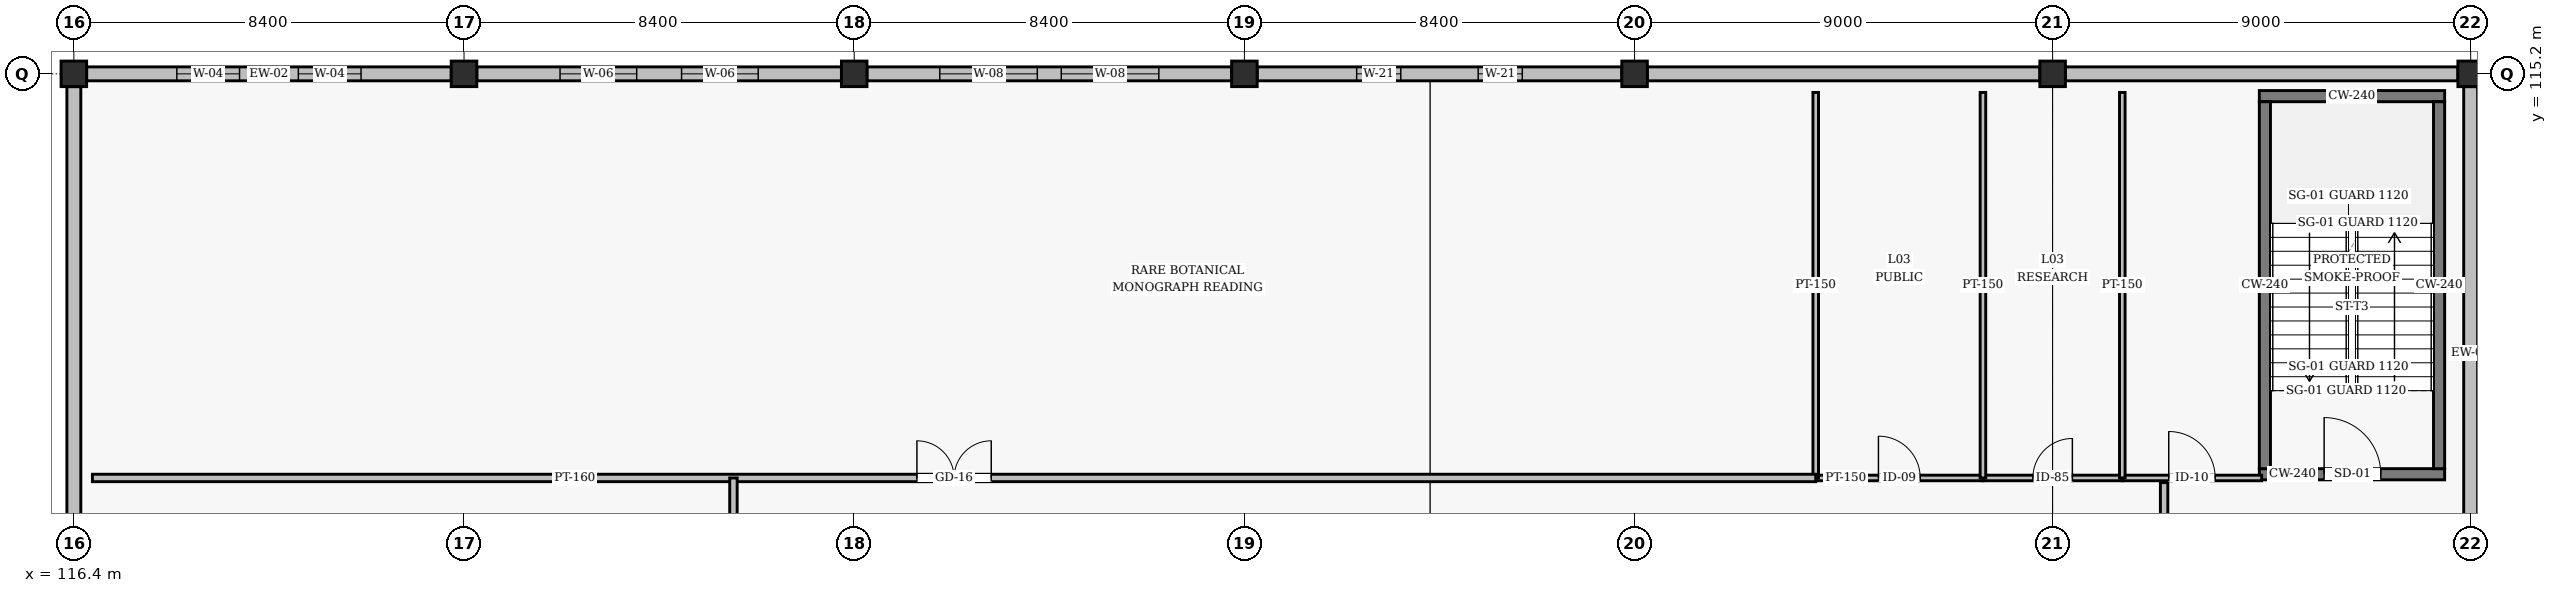
"""IFC4 building model, lengths in metres.
Left out: names, types, materials, properties, quantities, classifications, styles, units other than length and angle.
Written with IfcOpenShell. Run it as: python <this file> out.ifc"""

import sys

from ifc_helpers import new_model, si_unit, direction, frame, frame_2d, origin, origin_2d, place, context, subcontext, project, spatial, rectangle, hollow_rectangle, extrude, element, fill, save


model = new_model("IFC4")
c1 = context("Model", 3, precision=1e-05, world=origin(), true_north=direction((0.0, 1.0)))
c2 = subcontext(c1, "Body", "Model", "MODEL_VIEW")
j1 = project(units=[si_unit("LENGTHUNIT", "METRE"), si_unit("PLANEANGLEUNIT", "RADIAN")], contexts=[c1])
p1 = place(None, origin())
s1 = spatial("IfcSite", under=j1, at=p1, CompositionType="ELEMENT")
p2 = place(p1, origin())
s2 = spatial("IfcBuilding", under=s1, at=p2, CompositionType="ELEMENT")
p3 = place(p2, frame((0.0, 0.0, 13.2)))
s3 = spatial("IfcBuildingStorey", under=s2, at=p3, CompositionType="ELEMENT", Elevation=13.2)
for number, where, z_axis, x_axis in (
    (1, (116.4, 115.2, 0.0), (0.0, 0.0, 1.0), (1.0, 0.0, 0.0)),
    (2, (124.8, 115.2, 0.0), (0.0, 0.0, 1.0), (1.0, 0.0, 0.0)),
    (3, (133.2, 115.2, 0.0), (0.0, 0.0, 1.0), (1.0, 0.0, 0.0)),
    (4, (141.6, 115.2, 0.0), (0.0, 0.0, 1.0), (1.0, 0.0, 0.0)),
    (5, (150.0, 115.2, 0.0), (0.0, 0.0, 1.0), (1.0, 0.0, 0.0)),
    (6, (159.0, 115.2, 0.0), (0.0, 0.0, 1.0), (1.0, 0.0, 0.0)),
    (7, (168.0, 115.2, 0.0), (0.0, 0.0, 1.0), (1.0, 0.0, 0.0)),
):
    element("IfcColumn", number, at=place(p3, frame(where, z_axis=z_axis, x_axis=x_axis)), inside=s3, PredefinedType="COLUMN", context=c2, shape_type="SweptSolid", body=[
        extrude(hollow_rectangle(XDim=0.55, YDim=0.55, WallThickness=0.022, InnerFilletRadius=0.022, OuterFilletRadius=0.044, at=origin_2d()), origin(), (0.0, 0.0, 1.0), 3.9),
    ])
p4 = place(p3, frame((168.0, 103.475, 0.0), z_axis=(0.0, 0.0, 1.0), x_axis=(0.0, 1.0, 0.0)))
e8 = element("IfcWall", 8, at=p4, inside=s3, PredefinedType="SOLIDWALL", context=c2, shape_type="SweptSolid", body=[
    extrude(rectangle(XDim=11.45, YDim=0.3, at=frame_2d((5.725, 0.0))), origin(), (0.0, 0.0, 1.0), 2.828),
])
for number, where, z_axis, x_axis in (
    (9, (167.725, 115.2, 0.0), (0.0, 0.0, 1.0), (-1.0, 0.0, 0.0)),
    (10, (158.725, 115.2, 0.0), (0.0, 0.0, 1.0), (-1.0, 0.0, 0.0)),
):
    element("IfcWall", number, at=place(p3, frame(where, z_axis=z_axis, x_axis=x_axis)), inside=s3, PredefinedType="SOLIDWALL", context=c2, shape_type="SweptSolid", body=[
        extrude(rectangle(XDim=8.45, YDim=0.3, at=frame_2d((4.225, 0.0))), origin(), (0.0, 0.0, 1.0), 2.828),
    ])
p5 = place(p3, frame((149.725, 115.2, 0.0), z_axis=(0.0, 0.0, 1.0), x_axis=(-1.0, 0.0, 0.0)))
e11 = element("IfcWall", 11, at=p5, inside=s3, PredefinedType="SOLIDWALL", context=c2, shape_type="SweptSolid", body=[
    extrude(rectangle(XDim=7.85, YDim=0.3, at=frame_2d((3.925, 0.0))), origin(), (0.0, 0.0, 1.0), 2.928),
])
p6 = place(p5, frame((2.142, 0.0, 0.95)))
e12 = element("IfcOpeningElement", 12, at=p6, cuts=e11, PredefinedType="OPENING", context=c2, shape_type="SweptSolid", body=[
    extrude(rectangle(XDim=0.95, YDim=1.68, at=frame_2d((0.475, 0.84))), frame((0.0, 0.16, 0.0), z_axis=(0.0, -1.0, 0.0), x_axis=(1.0, 0.0, 0.0)), (0.0, 0.0, 1.0), 0.32),
])
p7 = place(p5, frame((4.758, 0.0, 0.95)))
e13 = element("IfcOpeningElement", 13, at=p7, cuts=e11, PredefinedType="OPENING", context=c2, shape_type="SweptSolid", body=[
    extrude(rectangle(XDim=0.95, YDim=1.68, at=frame_2d((0.475, 0.84))), frame((0.0, 0.16, 0.0), z_axis=(0.0, -1.0, 0.0), x_axis=(1.0, 0.0, 0.0)), (0.0, 0.0, 1.0), 0.32),
])
p8 = place(p3, frame((141.325, 115.2, 0.0), z_axis=(0.0, 0.0, 1.0), x_axis=(-1.0, 0.0, 0.0)))
e14 = element("IfcWall", 14, at=p8, inside=s3, PredefinedType="SOLIDWALL", context=c2, shape_type="SweptSolid", body=[
    extrude(rectangle(XDim=7.85, YDim=0.3, at=frame_2d((3.925, 0.0))), origin(), (0.0, 0.0, 1.0), 2.928),
])
p9 = place(p8, frame((1.567, 0.0, 0.85)))
e15 = element("IfcOpeningElement", 15, at=p9, cuts=e14, PredefinedType="OPENING", context=c2, shape_type="SweptSolid", body=[
    extrude(rectangle(XDim=2.1, YDim=1.78, at=frame_2d((1.05, 0.89))), frame((0.0, 0.16, 0.0), z_axis=(0.0, -1.0, 0.0), x_axis=(1.0, 0.0, 0.0)), (0.0, 0.0, 1.0), 0.32),
])
p10 = place(p8, frame((4.183, 0.0, 0.85)))
e16 = element("IfcOpeningElement", 16, at=p10, cuts=e14, PredefinedType="OPENING", context=c2, shape_type="SweptSolid", body=[
    extrude(rectangle(XDim=2.1, YDim=1.78, at=frame_2d((1.05, 0.89))), frame((0.0, 0.16, 0.0), z_axis=(0.0, -1.0, 0.0), x_axis=(1.0, 0.0, 0.0)), (0.0, 0.0, 1.0), 0.32),
])
p11 = place(p3, frame((132.925, 115.2, 0.0), z_axis=(0.0, 0.0, 1.0), x_axis=(-1.0, 0.0, 0.0)))
e17 = element("IfcWall", 17, at=p11, inside=s3, PredefinedType="SOLIDWALL", context=c2, shape_type="SweptSolid", body=[
    extrude(rectangle(XDim=7.85, YDim=0.3, at=frame_2d((3.925, 0.0))), origin(), (0.0, 0.0, 1.0), 2.928),
])
p12 = place(p11, frame((1.792, 0.0, 0.85)))
e18 = element("IfcOpeningElement", 18, at=p12, cuts=e17, PredefinedType="OPENING", context=c2, shape_type="SweptSolid", body=[
    extrude(rectangle(XDim=1.65, YDim=1.78, at=frame_2d((0.825, 0.89))), frame((0.0, 0.16, 0.0), z_axis=(0.0, -1.0, 0.0), x_axis=(1.0, 0.0, 0.0)), (0.0, 0.0, 1.0), 0.32),
])
p13 = place(p11, frame((4.408, 0.0, 0.85)))
e19 = element("IfcOpeningElement", 19, at=p13, cuts=e17, PredefinedType="OPENING", context=c2, shape_type="SweptSolid", body=[
    extrude(rectangle(XDim=1.65, YDim=1.78, at=frame_2d((0.825, 0.89))), frame((0.0, 0.16, 0.0), z_axis=(0.0, -1.0, 0.0), x_axis=(1.0, 0.0, 0.0)), (0.0, 0.0, 1.0), 0.32),
])
p14 = place(p3, frame((124.525, 115.2, 0.0), z_axis=(0.0, 0.0, 1.0), x_axis=(-1.0, 0.0, 0.0)))
e20 = element("IfcWall", 20, at=p14, inside=s3, PredefinedType="SOLIDWALL", context=c2, shape_type="SweptSolid", body=[
    extrude(rectangle(XDim=7.85, YDim=0.3, at=frame_2d((3.925, 0.0))), origin(), (0.0, 0.0, 1.0), 2.928),
])
p15 = place(p14, frame((1.942, 0.0, 0.85)))
e21 = element("IfcOpeningElement", 21, at=p15, cuts=e20, PredefinedType="OPENING", context=c2, shape_type="SweptSolid", body=[
    extrude(rectangle(XDim=1.35, YDim=1.78, at=frame_2d((0.675, 0.89))), frame((0.0, 0.16, 0.0), z_axis=(0.0, -1.0, 0.0), x_axis=(1.0, 0.0, 0.0)), (0.0, 0.0, 1.0), 0.32),
])
p16 = place(p14, frame((4.558, 0.0, 0.85)))
e22 = element("IfcOpeningElement", 22, at=p16, cuts=e20, PredefinedType="OPENING", context=c2, shape_type="SweptSolid", body=[
    extrude(rectangle(XDim=1.35, YDim=1.78, at=frame_2d((0.675, 0.89))), frame((0.0, 0.16, 0.0), z_axis=(0.0, -1.0, 0.0), x_axis=(1.0, 0.0, 0.0)), (0.0, 0.0, 1.0), 0.32),
])
p17 = place(p3, frame((116.4, 114.925, 0.0), z_axis=(0.0, 0.0, 1.0), x_axis=(0.0, -1.0, 0.0)))
e23 = element("IfcWall", 23, at=p17, inside=s3, PredefinedType="SOLIDWALL", context=c2, shape_type="SweptSolid", body=[
    extrude(rectangle(XDim=11.45, YDim=0.3, at=frame_2d((5.725, 0.0))), origin(), (0.0, 0.0, 1.0), 2.828),
])
p18 = place(p3, frame((163.45, 106.58, 0.0), z_axis=(0.0, 0.0, 1.0), x_axis=(1.0, 0.0, 0.0)))
e24 = element("IfcWall", 24, at=p18, inside=s3, PredefinedType="SHEAR", context=c2, shape_type="SweptSolid", body=[
    extrude(rectangle(XDim=3.99, YDim=0.24, at=frame_2d((1.995, 0.0))), origin(), (0.0, 0.0, 1.0), 3.62),
])
p19 = place(p18, frame((1.395, 0.0, 0.0)))
e25 = element("IfcOpeningElement", 25, at=p19, cuts=e24, PredefinedType="OPENING", context=c2, shape_type="SweptSolid", body=[
    extrude(rectangle(XDim=1.22, YDim=2.18, at=frame_2d((0.61, 1.09))), frame((0.0, 0.13, 0.0), z_axis=(0.0, -1.0, 0.0), x_axis=(1.0, 0.0, 0.0)), (0.0, 0.0, 1.0), 0.26),
])
p20 = place(p3, frame((163.45, 114.72, 0.0), z_axis=(0.0, 0.0, 1.0), x_axis=(1.0, 0.0, 0.0)))
e26 = element("IfcWall", 26, at=p20, inside=s3, PredefinedType="SHEAR", context=c2, shape_type="SweptSolid", body=[
    extrude(rectangle(XDim=3.99, YDim=0.24, at=frame_2d((1.995, 0.0))), origin(), (0.0, 0.0, 1.0), 3.62),
])
for number, where, z_axis, x_axis in (
    (27, (163.57, 106.7, 0.0), (0.0, 0.0, 1.0), (0.0, 1.0, 0.0)),
    (28, (167.32, 106.7, 0.0), (0.0, 0.0, 1.0), (0.0, 1.0, 0.0)),
):
    element("IfcWall", number, at=place(p3, frame(where, z_axis=z_axis, x_axis=x_axis)), inside=s3, PredefinedType="SHEAR", context=c2, shape_type="SweptSolid", body=[
        extrude(rectangle(XDim=7.9, YDim=0.24, at=frame_2d((3.95, 0.0))), origin(), (0.0, 0.0, 1.0), 3.62),
    ])
p21 = place(p3, frame((153.9, 106.5, 0.0), z_axis=(0.0, 0.0, 1.0), x_axis=(1.0, 0.0, 0.0)))
e29 = element("IfcWall", 29, at=p21, inside=s3, PredefinedType="PARTITIONING", context=c2, shape_type="SweptSolid", body=[
    extrude(rectangle(XDim=3.6, YDim=0.12, at=frame_2d((1.8, 0.0))), origin(), (0.0, 0.0, 1.0), 3.62),
])
p22 = place(p21, frame((1.35, 0.0, 0.0)))
e30 = element("IfcOpeningElement", 30, at=p22, cuts=e29, PredefinedType="OPENING", context=c2, shape_type="SweptSolid", body=[
    extrude(rectangle(XDim=0.9, YDim=2.1, at=frame_2d((0.45, 1.05))), frame((0.0, 0.07, 0.0), z_axis=(0.0, -1.0, 0.0), x_axis=(1.0, 0.0, 0.0)), (0.0, 0.0, 1.0), 0.14),
])
p23 = place(p3, frame((157.5, 106.5, 0.0), z_axis=(0.0, 0.0, 1.0), x_axis=(1.0, 0.0, 0.0)))
e31 = element("IfcWall", 31, at=p23, inside=s3, PredefinedType="PARTITIONING", context=c2, shape_type="SweptSolid", body=[
    extrude(rectangle(XDim=3.0, YDim=0.12, at=frame_2d((1.5, 0.0))), origin(), (0.0, 0.0, 1.0), 2.92),
])
p24 = place(p23, frame((1.075, 0.0, 0.0)))
e32 = element("IfcOpeningElement", 32, at=p24, cuts=e31, PredefinedType="OPENING", context=c2, shape_type="SweptSolid", body=[
    extrude(rectangle(XDim=0.85, YDim=2.1, at=frame_2d((0.425, 1.05))), frame((0.0, 0.07, 0.0), z_axis=(0.0, -1.0, 0.0), x_axis=(1.0, 0.0, 0.0)), (0.0, 0.0, 1.0), 0.14),
])
p25 = place(p3, frame((160.5, 106.5, 0.0), z_axis=(0.0, 0.0, 1.0), x_axis=(1.0, 0.0, 0.0)))
e33 = element("IfcWall", 33, at=p25, inside=s3, PredefinedType="PARTITIONING", context=c2, shape_type="SweptSolid", body=[
    extrude(rectangle(XDim=3.0, YDim=0.12, at=frame_2d((1.5, 0.0))), origin(), (0.0, 0.0, 1.0), 3.62),
])
p26 = place(p25, frame((1.0, 0.0, 0.0)))
e34 = element("IfcOpeningElement", 34, at=p26, cuts=e33, PredefinedType="OPENING", context=c2, shape_type="SweptSolid", body=[
    extrude(rectangle(XDim=1.0, YDim=2.1, at=frame_2d((0.5, 1.05))), frame((0.0, 0.07, 0.0), z_axis=(0.0, -1.0, 0.0), x_axis=(1.0, 0.0, 0.0)), (0.0, 0.0, 1.0), 0.14),
])
for number, where, z_axis, x_axis in (
    (35, (153.9, 106.5, 0.0), (0.0, 0.0, 1.0), (0.0, 1.0, 0.0)),
    (36, (157.5, 106.5, 0.0), (0.0, 0.0, 1.0), (0.0, 1.0, 0.0)),
):
    element("IfcWall", number, at=place(p3, frame(where, z_axis=z_axis, x_axis=x_axis)), inside=s3, PredefinedType="PARTITIONING", context=c2, shape_type="SweptSolid", body=[
        extrude(rectangle(XDim=8.3, YDim=0.12, at=frame_2d((4.15, 0.0))), origin(), (0.0, 0.0, 1.0), 3.224),
    ])
p27 = place(p3, frame((160.5, 106.5, 0.0), z_axis=(0.0, 0.0, 1.0), x_axis=(0.0, 1.0, 0.0)))
e37 = element("IfcWall", 37, at=p27, inside=s3, PredefinedType="PARTITIONING", context=c2, shape_type="SweptSolid", body=[
    extrude(rectangle(XDim=8.3, YDim=0.12, at=frame_2d((4.15, 0.0))), origin(), (0.0, 0.0, 1.0), 3.62),
])
p28 = place(p3, frame((161.4, 92.3, 0.0), z_axis=(0.0, 0.0, 1.0), x_axis=(0.0, 1.0, 0.0)))
e38 = element("IfcWall", 38, at=p28, inside=s3, PredefinedType="PARTITIONING", context=c2, shape_type="SweptSolid", body=[
    extrude(rectangle(XDim=14.1, YDim=0.16, at=frame_2d((7.05, 0.0))), origin(), (0.0, 0.0, 1.0), 2.97),
])
p29 = place(p28, frame((6.5, 0.0, 0.0)))
e39 = element("IfcOpeningElement", 39, at=p29, cuts=e38, PredefinedType="OPENING", context=c2, shape_type="SweptSolid", body=[
    extrude(rectangle(XDim=1.08, YDim=2.08, at=frame_2d((0.54, 1.04))), frame((0.0, 0.09, 0.0), z_axis=(0.0, -1.0, 0.0), x_axis=(1.0, 0.0, 0.0)), (0.0, 0.0, 1.0), 0.18),
])
p30 = place(p3, frame((116.8, 106.5, 0.0), z_axis=(0.0, 0.0, 1.0), x_axis=(1.0, 0.0, 0.0)))
e40 = element("IfcWall", 40, at=p30, inside=s3, PredefinedType="PARTITIONING", context=c2, shape_type="SweptSolid", body=[
    extrude(rectangle(XDim=37.1, YDim=0.16, at=frame_2d((18.55, 0.0))), origin(), (0.0, 0.0, 1.0), 2.92),
])
p31 = place(p30, frame((17.75, 0.0, 0.0)))
e41 = element("IfcOpeningElement", 41, at=p31, cuts=e40, PredefinedType="OPENING", context=c2, shape_type="SweptSolid", body=[
    extrude(rectangle(XDim=1.6, YDim=2.1, at=frame_2d((0.8, 1.05))), frame((0.0, 0.09, 0.0), z_axis=(0.0, -1.0, 0.0), x_axis=(1.0, 0.0, 0.0)), (0.0, 0.0, 1.0), 0.18),
])
p32 = place(p3, frame((130.6, 92.35, 0.0), z_axis=(0.0, 0.0, 1.0), x_axis=(0.0, 1.0, 0.0)))
e42 = element("IfcWall", 42, at=p32, inside=s3, PredefinedType="PARTITIONING", context=c2, shape_type="SweptSolid", body=[
    extrude(rectangle(XDim=14.15, YDim=0.16, at=frame_2d((7.075, 0.0))), origin(), (0.0, 0.0, 1.0), 3.07),
])
p33 = place(p32, frame((6.525, 0.0, 0.0)))
e43 = element("IfcOpeningElement", 43, at=p33, cuts=e42, PredefinedType="OPENING", context=c2, shape_type="SweptSolid", body=[
    extrude(rectangle(XDim=1.08, YDim=2.08, at=frame_2d((0.54, 1.04))), frame((0.0, 0.09, 0.0), z_axis=(0.0, -1.0, 0.0), x_axis=(1.0, 0.0, 0.0)), (0.0, 0.0, 1.0), 0.18),
])
p34 = place(p6, origin())
e44 = element("IfcWindow", 44, at=p34, inside=s3, PartitioningType="SINGLE_PANEL", PredefinedType="WINDOW", context=c2, shape_type="SweptSolid", body=[
    extrude(rectangle(XDim=0.95, YDim=1.68, at=frame_2d((0.475, 0.84))), frame((0.0, 0.03, 0.0), z_axis=(0.0, -1.0, 0.0), x_axis=(1.0, 0.0, 0.0)), (0.0, 0.0, 1.0), 0.06),
])
fill(e12, e44)
p35 = place(p7, origin())
e45 = element("IfcWindow", 45, at=p35, inside=s3, PartitioningType="SINGLE_PANEL", PredefinedType="WINDOW", context=c2, shape_type="SweptSolid", body=[
    extrude(rectangle(XDim=0.95, YDim=1.68, at=frame_2d((0.475, 0.84))), frame((0.0, 0.03, 0.0), z_axis=(0.0, -1.0, 0.0), x_axis=(1.0, 0.0, 0.0)), (0.0, 0.0, 1.0), 0.06),
])
fill(e13, e45)
p36 = place(p9, origin())
e46 = element("IfcWindow", 46, at=p36, inside=s3, PartitioningType="SINGLE_PANEL", PredefinedType="WINDOW", context=c2, shape_type="SweptSolid", body=[
    extrude(rectangle(XDim=2.1, YDim=1.78, at=frame_2d((1.05, 0.89))), frame((0.0, 0.03, 0.0), z_axis=(0.0, -1.0, 0.0), x_axis=(1.0, 0.0, 0.0)), (0.0, 0.0, 1.0), 0.06),
])
fill(e15, e46)
p37 = place(p10, origin())
e47 = element("IfcWindow", 47, at=p37, inside=s3, PartitioningType="SINGLE_PANEL", PredefinedType="WINDOW", context=c2, shape_type="SweptSolid", body=[
    extrude(rectangle(XDim=2.1, YDim=1.78, at=frame_2d((1.05, 0.89))), frame((0.0, 0.03, 0.0), z_axis=(0.0, -1.0, 0.0), x_axis=(1.0, 0.0, 0.0)), (0.0, 0.0, 1.0), 0.06),
])
fill(e16, e47)
p38 = place(p12, origin())
e48 = element("IfcWindow", 48, at=p38, inside=s3, PartitioningType="SINGLE_PANEL", PredefinedType="WINDOW", context=c2, shape_type="SweptSolid", body=[
    extrude(rectangle(XDim=1.65, YDim=1.78, at=frame_2d((0.825, 0.89))), frame((0.0, 0.03, 0.0), z_axis=(0.0, -1.0, 0.0), x_axis=(1.0, 0.0, 0.0)), (0.0, 0.0, 1.0), 0.06),
])
fill(e18, e48)
p39 = place(p13, origin())
e49 = element("IfcWindow", 49, at=p39, inside=s3, PartitioningType="SINGLE_PANEL", PredefinedType="WINDOW", context=c2, shape_type="SweptSolid", body=[
    extrude(rectangle(XDim=1.65, YDim=1.78, at=frame_2d((0.825, 0.89))), frame((0.0, 0.03, 0.0), z_axis=(0.0, -1.0, 0.0), x_axis=(1.0, 0.0, 0.0)), (0.0, 0.0, 1.0), 0.06),
])
fill(e19, e49)
p40 = place(p15, origin())
e50 = element("IfcWindow", 50, at=p40, inside=s3, PartitioningType="SINGLE_PANEL", PredefinedType="WINDOW", context=c2, shape_type="SweptSolid", body=[
    extrude(rectangle(XDim=1.35, YDim=1.78, at=frame_2d((0.675, 0.89))), frame((0.0, 0.03, 0.0), z_axis=(0.0, -1.0, 0.0), x_axis=(1.0, 0.0, 0.0)), (0.0, 0.0, 1.0), 0.06),
])
fill(e21, e50)
p41 = place(p16, origin())
e51 = element("IfcWindow", 51, at=p41, inside=s3, PartitioningType="SINGLE_PANEL", PredefinedType="WINDOW", context=c2, shape_type="SweptSolid", body=[
    extrude(rectangle(XDim=1.35, YDim=1.78, at=frame_2d((0.675, 0.89))), frame((0.0, 0.03, 0.0), z_axis=(0.0, -1.0, 0.0), x_axis=(1.0, 0.0, 0.0)), (0.0, 0.0, 1.0), 0.06),
])
fill(e22, e51)
p42 = place(p19, origin())
e52 = element("IfcDoor", 52, at=p42, inside=s3, OperationType="SINGLE_SWING_LEFT", PredefinedType="DOOR", context=c2, shape_type="SweptSolid", body=[
    extrude(rectangle(XDim=1.22, YDim=2.18, at=frame_2d((0.61, 1.09))), frame((0.0, 0.025, 0.0), z_axis=(0.0, -1.0, 0.0), x_axis=(1.0, 0.0, 0.0)), (0.0, 0.0, 1.0), 0.05),
])
fill(e25, e52)
p43 = place(p22, origin())
e53 = element("IfcDoor", 53, at=p43, inside=s3, OperationType="SINGLE_SWING_LEFT", PredefinedType="DOOR", context=c2, shape_type="SweptSolid", body=[
    extrude(rectangle(XDim=0.9, YDim=2.1, at=frame_2d((0.45, 1.05))), frame((0.0, 0.025, 0.0), z_axis=(0.0, -1.0, 0.0), x_axis=(1.0, 0.0, 0.0)), (0.0, 0.0, 1.0), 0.05),
])
fill(e30, e53)
p44 = place(p24, origin())
e54 = element("IfcDoor", 54, at=p44, inside=s3, OperationType="SINGLE_SWING_RIGHT", PredefinedType="DOOR", context=c2, shape_type="SweptSolid", body=[
    extrude(rectangle(XDim=0.85, YDim=2.1, at=frame_2d((0.425, 1.05))), frame((0.0, 0.025, 0.0), z_axis=(0.0, -1.0, 0.0), x_axis=(1.0, 0.0, 0.0)), (0.0, 0.0, 1.0), 0.05),
])
fill(e32, e54)
p45 = place(p26, origin())
e55 = element("IfcDoor", 55, at=p45, inside=s3, OperationType="SINGLE_SWING_LEFT", PredefinedType="DOOR", context=c2, shape_type="SweptSolid", body=[
    extrude(rectangle(XDim=1.0, YDim=2.1, at=frame_2d((0.5, 1.05))), frame((0.0, 0.025, 0.0), z_axis=(0.0, -1.0, 0.0), x_axis=(1.0, 0.0, 0.0)), (0.0, 0.0, 1.0), 0.05),
])
fill(e34, e55)
p46 = place(p31, origin())
e56 = element("IfcDoor", 56, at=p46, inside=s3, OperationType="DOUBLE_DOOR_SINGLE_SWING", PredefinedType="DOOR", context=c2, shape_type="SweptSolid", body=[
    extrude(rectangle(XDim=1.6, YDim=2.1, at=frame_2d((0.8, 1.05))), frame((0.0, 0.025, 0.0), z_axis=(0.0, -1.0, 0.0), x_axis=(1.0, 0.0, 0.0)), (0.0, 0.0, 1.0), 0.05),
])
fill(e41, e56)
save(model, sys.argv[1])
